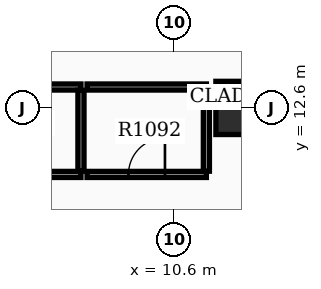
"""IFC4 building model, lengths in metres.
Left out: names, types, materials, properties, quantities, classifications, styles, units other than length and angle.
Written with IfcOpenShell. Run it as: python <this file> out.ifc"""

import sys

from ifc_helpers import new_model, si_unit, direction, frame, frame_2d, origin, origin_2d, place, context, subcontext, project, spatial, rectangle, extrude, element, fill, save


model = new_model("IFC4")
c1 = context("Model", 3, precision=1e-05, world=origin(), true_north=direction((0.0, 1.0)))
c2 = subcontext(c1, "Body", "Model", "MODEL_VIEW")
j1 = project(units=[si_unit("LENGTHUNIT", "METRE"), si_unit("PLANEANGLEUNIT", "RADIAN")], contexts=[c1])
p1 = place(None, origin())
s1 = spatial("IfcSite", under=j1, at=p1, CompositionType="ELEMENT")
p2 = place(p1, origin())
s2 = spatial("IfcBuilding", under=s1, at=p2, CompositionType="ELEMENT")
p3 = place(p2, frame((0.0, 0.0, 71.7)))
s3 = spatial("IfcBuildingStorey", under=s2, at=p3, CompositionType="ELEMENT", Elevation=71.7)
p4 = place(p3, frame((12.4, 12.6, 0.0), z_axis=(0.0, 0.0, 1.0), x_axis=(1.0, 0.0, 0.0)))
e1 = element("IfcColumn", 1, at=p4, inside=s3, PredefinedType="COLUMN", context=c2, shape_type="SweptSolid", body=[
    extrude(rectangle(XDim=1.4, YDim=1.4, at=origin_2d()), origin(), (0.0, 0.0, 1.0), 3.9),
])
p5 = place(p3, frame((4.95, 10.85, 0.0), z_axis=(0.0, 0.0, 1.0), x_axis=(1.0, 0.0, 0.0)))
e2 = element("IfcWall", 2, at=p5, inside=s3, PredefinedType="PARTITIONING", context=c2, shape_type="SweptSolid", body=[
    extrude(rectangle(XDim=3.2, YDim=0.16, at=frame_2d((1.6, 0.0))), origin(), (0.0, 0.0, 1.0), 2.9),
])
p6 = place(p5, frame((1.12, 0.0, 0.0)))
e3 = element("IfcOpeningElement", 3, at=p6, cuts=e2, PredefinedType="OPENING", context=c2, shape_type="SweptSolid", body=[
    extrude(rectangle(XDim=0.96, YDim=2.15, at=frame_2d((0.48, 1.075))), frame((0.0, 0.09, 0.0), z_axis=(0.0, -1.0, 0.0), x_axis=(1.0, 0.0, 0.0)), (0.0, 0.0, 1.0), 0.18),
])
p7 = place(p3, frame((4.95, 13.15, 0.0), z_axis=(0.0, 0.0, 1.0), x_axis=(1.0, 0.0, 0.0)))
e4 = element("IfcWall", 4, at=p7, inside=s3, PredefinedType="PARTITIONING", context=c2, shape_type="SweptSolid", body=[
    extrude(rectangle(XDim=3.2, YDim=0.16, at=frame_2d((1.6, 0.0))), origin(), (0.0, 0.0, 1.0), 2.9),
])
p8 = place(p3, frame((8.15, 10.935, 0.0), z_axis=(0.0, 0.0, 1.0), x_axis=(0.0, 1.0, 0.0)))
e5 = element("IfcWall", 5, at=p8, inside=s3, PredefinedType="PARTITIONING", context=c2, shape_type="SweptSolid", body=[
    extrude(rectangle(XDim=2.13, YDim=0.16, at=frame_2d((1.065, 0.0))), origin(), (0.0, 0.0, 1.0), 2.9),
])
p9 = place(p3, frame((8.31, 10.85, 0.0), z_axis=(0.0, 0.0, 1.0), x_axis=(1.0, 0.0, 0.0)))
e6 = element("IfcWall", 6, at=p9, inside=s3, PredefinedType="PARTITIONING", context=c2, shape_type="SweptSolid", body=[
    extrude(rectangle(XDim=3.14, YDim=0.16, at=frame_2d((1.57, 0.0))), origin(), (0.0, 0.0, 1.0), 2.9),
])
p10 = place(p9, frame((1.09, 0.0, 0.0)))
e7 = element("IfcOpeningElement", 7, at=p10, cuts=e6, PredefinedType="OPENING", context=c2, shape_type="SweptSolid", body=[
    extrude(rectangle(XDim=0.96, YDim=2.15, at=frame_2d((0.48, 1.075))), frame((0.0, 0.09, 0.0), z_axis=(0.0, -1.0, 0.0), x_axis=(1.0, 0.0, 0.0)), (0.0, 0.0, 1.0), 0.18),
])
p11 = place(p3, frame((8.31, 13.15, 0.0), z_axis=(0.0, 0.0, 1.0), x_axis=(1.0, 0.0, 0.0)))
e8 = element("IfcWall", 8, at=p11, inside=s3, PredefinedType="PARTITIONING", context=c2, shape_type="SweptSolid", body=[
    extrude(rectangle(XDim=3.14, YDim=0.16, at=frame_2d((1.57, 0.0))), origin(), (0.0, 0.0, 1.0), 2.9),
])
p12 = place(p3, frame((11.45, 10.935, 0.0), z_axis=(0.0, 0.0, 1.0), x_axis=(0.0, 1.0, 0.0)))
e9 = element("IfcWall", 9, at=p12, inside=s3, PredefinedType="PARTITIONING", context=c2, shape_type="SweptSolid", body=[
    extrude(rectangle(XDim=2.13, YDim=0.16, at=frame_2d((1.065, 0.0))), origin(), (0.0, 0.0, 1.0), 2.9),
])
p13 = place(p10, origin())
e10 = element("IfcDoor", 10, at=p13, inside=s3, OperationType="SINGLE_SWING_RIGHT", PredefinedType="DOOR", context=c2, shape_type="SweptSolid", body=[
    extrude(rectangle(XDim=0.96, YDim=2.15, at=frame_2d((0.48, 1.075))), frame((0.0, 0.025, 0.0), z_axis=(0.0, -1.0, 0.0), x_axis=(1.0, 0.0, 0.0)), (0.0, 0.0, 1.0), 0.05),
])
fill(e7, e10)
save(model, sys.argv[1])
